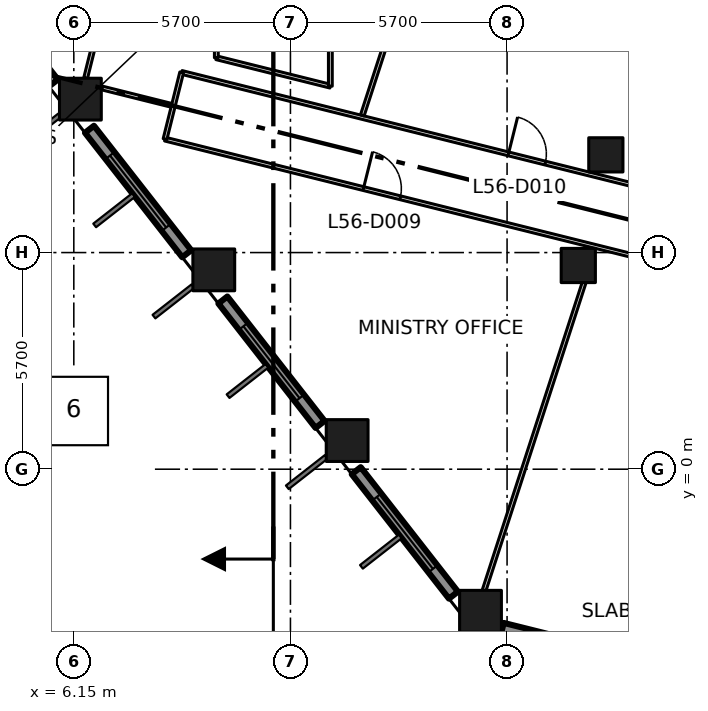
"""IFC4 building model, lengths in metres.
Left out: names, types, materials, properties, quantities, classifications, styles, units other than length and angle.
Written with IfcOpenShell. Run it as: python <this file> out.ifc"""

import sys

from ifc_helpers import new_model, si_unit, direction, frame, frame_2d, origin, origin_2d, place, context, subcontext, project, spatial, rectangle, extrude, element, fill, save


model = new_model("IFC4")
c1 = context("Model", 3, precision=1e-05, world=origin(), true_north=direction((0.0, 1.0)))
c2 = subcontext(c1, "Body", "Model", "MODEL_VIEW")
j1 = project(units=[si_unit("LENGTHUNIT", "METRE"), si_unit("PLANEANGLEUNIT", "RADIAN")], contexts=[c1])
p1 = place(None, origin())
s1 = spatial("IfcSite", under=j1, at=p1, CompositionType="ELEMENT")
p2 = place(p1, origin())
s2 = spatial("IfcBuilding", under=s1, at=p2, CompositionType="ELEMENT")
p3 = place(p2, frame((0.0, 0.0, 246.6)))
s3 = spatial("IfcBuildingStorey", under=s2, at=p3, CompositionType="ELEMENT", Elevation=246.6)
for number, where, z_axis, x_axis in (
    (1, (16.851, -3.738, 0.0), (0.0, 0.0, 1.0), (1.0, 0.0, 0.0)),
    (2, (13.342, 0.754, 0.0), (0.0, 0.0, 1.0), (1.0, 0.0, 0.0)),
    (3, (9.833, 5.245, 0.0), (0.0, 0.0, 1.0), (1.0, 0.0, 0.0)),
    (4, (6.323, 9.737, 0.0), (0.0, 0.0, 1.0), (1.0, 0.0, 0.0)),
):
    element("IfcColumn", number, at=place(p3, frame(where, z_axis=z_axis, x_axis=x_axis)), inside=s3, PredefinedType="COLUMN", context=c2, shape_type="SweptSolid", body=[
        extrude(rectangle(XDim=1.1, YDim=1.1, at=origin_2d()), origin(), (0.0, 0.0, 1.0), 4.2),
    ])
for number, where, z_axis, x_axis in (
    (5, (19.424, 5.36, 0.0), (0.0, 0.0, 1.0), (1.0, 0.0, 0.0)),
    (6, (20.149, 8.271, 0.0), (0.0, 0.0, 1.0), (1.0, 0.0, 0.0)),
):
    element("IfcColumn", number, at=place(p3, frame(where, z_axis=z_axis, x_axis=x_axis)), inside=s3, PredefinedType="COLUMN", context=c2, shape_type="SweptSolid", body=[
        extrude(rectangle(XDim=0.9, YDim=0.9, at=origin_2d()), origin(), (0.0, 0.0, 1.0), 4.2),
    ])
p4 = place(p3, frame((3.053, 13.436, 0.0), z_axis=(0.0, 0.0, 1.0), x_axis=(0.615699893917, -0.787980736205, 0.0)))
e7 = element("IfcWall", 7, at=p4, inside=s3, PredefinedType="SOLIDWALL", context=c2, shape_type="SweptSolid", body=[
    extrude(rectangle(XDim=4.156, YDim=0.3, at=frame_2d((2.078, 0.0))), origin(), (0.0, 0.0, 1.0), 3.15),
])
p5 = place(p4, frame((0.878, 0.0, 0.8)))
e8 = element("IfcOpeningElement", 8, at=p5, cuts=e7, PredefinedType="OPENING", context=c2, shape_type="SweptSolid", body=[
    extrude(rectangle(XDim=2.4, YDim=2.1, at=frame_2d((1.2, 1.05))), frame((0.0, 0.16, 0.0), z_axis=(0.0, -1.0, 0.0), x_axis=(1.0, 0.0, 0.0)), (0.0, 0.0, 1.0), 0.32),
])
p6 = place(p3, frame((6.562, 8.944, 0.0), z_axis=(0.0, 0.0, 1.0), x_axis=(0.615699893917, -0.787980736205, 0.0)))
e9 = element("IfcWall", 9, at=p6, inside=s3, PredefinedType="SOLIDWALL", context=c2, shape_type="SweptSolid", body=[
    extrude(rectangle(XDim=4.156, YDim=0.3, at=frame_2d((2.078, 0.0))), origin(), (0.0, 0.0, 1.0), 3.15),
])
p7 = place(p6, frame((0.878, 0.0, 0.8)))
e10 = element("IfcOpeningElement", 10, at=p7, cuts=e9, PredefinedType="OPENING", context=c2, shape_type="SweptSolid", body=[
    extrude(rectangle(XDim=2.4, YDim=2.1, at=frame_2d((1.2, 1.05))), frame((0.0, 0.16, 0.0), z_axis=(0.0, -1.0, 0.0), x_axis=(1.0, 0.0, 0.0)), (0.0, 0.0, 1.0), 0.32),
])
p8 = place(p3, frame((10.072, 4.452, 0.0), z_axis=(0.0, 0.0, 1.0), x_axis=(0.615660006568, -0.788011901124, 0.0)))
e11 = element("IfcWall", 11, at=p8, inside=s3, PredefinedType="SOLIDWALL", context=c2, shape_type="SweptSolid", body=[
    extrude(rectangle(XDim=4.155, YDim=0.3, at=frame_2d((2.077, 0.0))), origin(), (0.0, 0.0, 1.0), 3.15),
])
p9 = place(p8, frame((0.878, 0.0, 0.8)))
e12 = element("IfcOpeningElement", 12, at=p9, cuts=e11, PredefinedType="OPENING", context=c2, shape_type="SweptSolid", body=[
    extrude(rectangle(XDim=2.4, YDim=2.1, at=frame_2d((1.2, 1.05))), frame((0.0, 0.16, 0.0), z_axis=(0.0, -1.0, 0.0), x_axis=(1.0, 0.0, 0.0)), (0.0, 0.0, 1.0), 0.32),
])
p10 = place(p3, frame((13.581, -0.039, 0.0), z_axis=(0.0, 0.0, 1.0), x_axis=(0.615545986363, -0.788100969846, 0.0)))
e13 = element("IfcWall", 13, at=p10, inside=s3, PredefinedType="SOLIDWALL", context=c2, shape_type="SweptSolid", body=[
    extrude(rectangle(XDim=4.156, YDim=0.3, at=frame_2d((2.078, 0.0))), origin(), (0.0, 0.0, 1.0), 3.15),
])
p11 = place(p10, frame((0.878, 0.0, 0.8)))
e14 = element("IfcOpeningElement", 14, at=p11, cuts=e13, PredefinedType="OPENING", context=c2, shape_type="SweptSolid", body=[
    extrude(rectangle(XDim=2.4, YDim=2.1, at=frame_2d((1.2, 1.05))), frame((0.0, 0.16, 0.0), z_axis=(0.0, -1.0, 0.0), x_axis=(1.0, 0.0, 0.0)), (0.0, 0.0, 1.0), 0.32),
])
p12 = place(p3, frame((17.425, -4.19, 0.0), z_axis=(0.0, 0.0, 1.0), x_axis=(0.970270592847, -0.242022677978, 0.0)))
e15 = element("IfcWall", 15, at=p12, inside=s3, PredefinedType="SOLIDWALL", context=c2, shape_type="SweptSolid", body=[
    extrude(rectangle(XDim=4.368, YDim=0.3, at=frame_2d((2.184, 0.0))), origin(), (0.0, 0.0, 1.0), 3.15),
])
p13 = place(p12, frame((0.983, 0.0, 0.8)))
e16 = element("IfcOpeningElement", 16, at=p13, cuts=e15, PredefinedType="OPENING", context=c2, shape_type="SweptSolid", body=[
    extrude(rectangle(XDim=2.4, YDim=2.1, at=frame_2d((1.2, 1.05))), frame((0.0, 0.16, 0.0), z_axis=(0.0, -1.0, 0.0), x_axis=(1.0, 0.0, 0.0)), (0.0, 0.0, 1.0), 0.32),
])
p14 = place(p3, frame((8.55, 8.685, 0.0), z_axis=(0.0, 0.0, 1.0), x_axis=(0.970297603286, -0.241914367199, 0.0)))
e17 = element("IfcWall", 17, at=p14, inside=s3, PredefinedType="PARTITIONING", context=c2, shape_type="SweptSolid", body=[
    extrude(rectangle(XDim=50.675, YDim=0.1, at=frame_2d((25.337, 0.0))), origin(), (0.0, 0.0, 1.0), 3.9),
])
p15 = place(p14, frame((35.657, 0.0, 0.0)))
e18 = element("IfcOpeningElement", 18, at=p15, cuts=e17, PredefinedType="OPENING", context=c2, shape_type="SweptSolid", body=[
    extrude(rectangle(XDim=1.8, YDim=2.1, at=frame_2d((0.9, 1.05))), frame((0.0, 0.06, 0.0), z_axis=(0.0, -1.0, 0.0), x_axis=(1.0, 0.0, 0.0)), (0.0, 0.0, 1.0), 0.12),
])
p16 = place(p14, frame((14.657, 0.0, 0.0)))
e19 = element("IfcOpeningElement", 19, at=p16, cuts=e17, PredefinedType="OPENING", context=c2, shape_type="SweptSolid", body=[
    extrude(rectangle(XDim=1.0, YDim=2.1, at=frame_2d((0.5, 1.05))), frame((0.0, 0.06, 0.0), z_axis=(0.0, -1.0, 0.0), x_axis=(1.0, 0.0, 0.0)), (0.0, 0.0, 1.0), 0.12),
])
p17 = place(p14, frame((19.357, 0.0, 0.0)))
e20 = element("IfcOpeningElement", 20, at=p17, cuts=e17, PredefinedType="OPENING", context=c2, shape_type="SweptSolid", body=[
    extrude(rectangle(XDim=1.8, YDim=2.1, at=frame_2d((0.9, 1.05))), frame((0.0, 0.06, 0.0), z_axis=(0.0, -1.0, 0.0), x_axis=(1.0, 0.0, 0.0)), (0.0, 0.0, 1.0), 0.12),
])
p18 = place(p14, frame((5.38, 0.0, 0.0)))
e21 = element("IfcOpeningElement", 21, at=p18, cuts=e17, PredefinedType="OPENING", context=c2, shape_type="SweptSolid", body=[
    extrude(rectangle(XDim=1.0, YDim=2.1, at=frame_2d((0.5, 1.05))), frame((0.0, 0.06, 0.0), z_axis=(0.0, -1.0, 0.0), x_axis=(1.0, 0.0, 0.0)), (0.0, 0.0, 1.0), 0.12),
])
p19 = place(p3, frame((8.988, 10.44, 0.0), z_axis=(0.0, 0.0, 1.0), x_axis=(0.970301223092, -0.241899848006, 0.0)))
e22 = element("IfcWall", 22, at=p19, inside=s3, PredefinedType="PARTITIONING", context=c2, shape_type="SweptSolid", body=[
    extrude(rectangle(XDim=19.879, YDim=0.1, at=frame_2d((9.94, 0.0))), origin(), (0.0, 0.0, 1.0), 3.9),
])
p20 = place(p19, frame((8.861, 0.0, 0.0)))
e23 = element("IfcOpeningElement", 23, at=p20, cuts=e22, PredefinedType="OPENING", context=c2, shape_type="SweptSolid", body=[
    extrude(rectangle(XDim=1.0, YDim=2.1, at=frame_2d((0.5, 1.05))), frame((0.0, 0.06, 0.0), z_axis=(0.0, -1.0, 0.0), x_axis=(1.0, 0.0, 0.0)), (0.0, 0.0, 1.0), 0.12),
])
p21 = place(p3, frame((8.988, 10.44, 0.0), z_axis=(0.0, 0.0, 1.0), x_axis=(-0.242154485745, -0.970237705428, 0.0)))
e24 = element("IfcWall", 24, at=p21, inside=s3, PredefinedType="PARTITIONING", context=c2, shape_type="SweptSolid", body=[
    extrude(rectangle(XDim=1.809, YDim=0.1, at=frame_2d((0.904, 0.0))), origin(), (0.0, 0.0, 1.0), 3.9),
])
p22 = place(p3, frame((9.9, 10.826, 0.0), z_axis=(0.0, 0.0, 1.0), x_axis=(0.970290953223, -0.241941038466, 0.0)))
e25 = element("IfcWall", 25, at=p22, inside=s3, PredefinedType="PARTITIONING", context=c2, shape_type="SweptSolid", body=[
    extrude(rectangle(XDim=3.092, YDim=0.1, at=frame_2d((1.546, 0.0))), origin(), (0.0, 0.0, 1.0), 3.9),
])
p23 = place(p3, frame((9.9, 12.2, 0.0), z_axis=(0.0, 0.0, 1.0), x_axis=(0.0, -1.0, 0.0)))
e26 = element("IfcWall", 26, at=p23, inside=s3, PredefinedType="PARTITIONING", context=c2, shape_type="SweptSolid", body=[
    extrude(rectangle(XDim=1.374, YDim=0.1, at=frame_2d((0.687, 0.0))), origin(), (0.0, 0.0, 1.0), 3.9),
])
p24 = place(p3, frame((12.9, 10.078, 0.0), z_axis=(0.0, 0.0, 1.0), x_axis=(0.0, 1.0, 0.0)))
e27 = element("IfcWall", 27, at=p24, inside=s3, PredefinedType="PARTITIONING", context=c2, shape_type="SweptSolid", body=[
    extrude(rectangle(XDim=4.022, YDim=0.1, at=frame_2d((2.011, 0.0))), origin(), (0.0, 0.0, 1.0), 3.9),
])
p25 = place(p3, frame((6.922, 12.138, 0.0), z_axis=(0.0, 0.0, 1.0), x_axis=(-0.242264600824, -0.970210215978, 0.0)))
e28 = element("IfcWall", 28, at=p25, inside=s3, PredefinedType="PARTITIONING", context=c2, shape_type="SweptSolid", body=[
    extrude(rectangle(XDim=1.908, YDim=0.1, at=frame_2d((0.954, 0.0))), origin(), (0.0, 0.0, 1.0), 3.9),
])
p26 = place(p3, frame((8.72, 9.574, 0.0), z_axis=(0.0, 0.0, 1.0), x_axis=(-0.970240497311, 0.242143299263, 0.0)))
e29 = element("IfcWall", 29, at=p26, inside=s3, PredefinedType="PARTITIONING", context=c2, shape_type="SweptSolid", body=[
    extrude(rectangle(XDim=1.904, YDim=0.1, at=frame_2d((0.952, 0.0))), origin(), (0.0, 0.0, 1.0), 3.9),
])
p27 = place(p3, frame((13.741, 9.31, 0.0), z_axis=(0.0, 0.0, 1.0), x_axis=(0.308976461467, 0.95106968528, 0.0)))
e30 = element("IfcWall", 30, at=p27, inside=s3, PredefinedType="PARTITIONING", context=c2, shape_type="SweptSolid", body=[
    extrude(rectangle(XDim=5.036, YDim=0.1, at=frame_2d((2.518, 0.0))), origin(), (0.0, 0.0, 1.0), 3.9),
])
p28 = place(p3, frame((16.946, -3.188, 0.0), z_axis=(0.0, 0.0, 1.0), x_axis=(0.308984279279, 0.951067145452, 0.0)))
e31 = element("IfcWall", 31, at=p28, inside=s3, PredefinedType="PARTITIONING", context=c2, shape_type="SweptSolid", body=[
    extrude(rectangle(XDim=8.515, YDim=0.1, at=frame_2d((4.257, 0.0))), origin(), (0.0, 0.0, 1.0), 3.9),
])
p29 = place(p7, origin())
e32 = element("IfcWindow", 32, at=p29, inside=s3, PartitioningType="DOUBLE_PANEL_VERTICAL", PredefinedType="WINDOW", context=c2, shape_type="SweptSolid", body=[
    extrude(rectangle(XDim=2.4, YDim=2.1, at=frame_2d((1.2, 1.05))), frame((0.0, 0.03, 0.0), z_axis=(0.0, -1.0, 0.0), x_axis=(1.0, 0.0, 0.0)), (0.0, 0.0, 1.0), 0.06),
])
fill(e10, e32)
p30 = place(p9, origin())
e33 = element("IfcWindow", 33, at=p30, inside=s3, PartitioningType="DOUBLE_PANEL_VERTICAL", PredefinedType="WINDOW", context=c2, shape_type="SweptSolid", body=[
    extrude(rectangle(XDim=2.4, YDim=2.1, at=frame_2d((1.2, 1.05))), frame((0.0, 0.03, 0.0), z_axis=(0.0, -1.0, 0.0), x_axis=(1.0, 0.0, 0.0)), (0.0, 0.0, 1.0), 0.06),
])
fill(e12, e33)
p31 = place(p11, origin())
e34 = element("IfcWindow", 34, at=p31, inside=s3, PartitioningType="DOUBLE_PANEL_VERTICAL", PredefinedType="WINDOW", context=c2, shape_type="SweptSolid", body=[
    extrude(rectangle(XDim=2.4, YDim=2.1, at=frame_2d((1.2, 1.05))), frame((0.0, 0.03, 0.0), z_axis=(0.0, -1.0, 0.0), x_axis=(1.0, 0.0, 0.0)), (0.0, 0.0, 1.0), 0.06),
])
fill(e14, e34)
p32 = place(p18, origin())
e35 = element("IfcDoor", 35, at=p32, inside=s3, OperationType="SINGLE_SWING_LEFT", PredefinedType="DOOR", context=c2, shape_type="SweptSolid", body=[
    extrude(rectangle(XDim=1.0, YDim=2.1, at=frame_2d((0.5, 1.05))), frame((0.0, 0.025, 0.0), z_axis=(0.0, -1.0, 0.0), x_axis=(1.0, 0.0, 0.0)), (0.0, 0.0, 1.0), 0.05),
])
fill(e21, e35)
p33 = place(p20, origin())
e36 = element("IfcDoor", 36, at=p33, inside=s3, OperationType="SINGLE_SWING_LEFT", PredefinedType="DOOR", context=c2, shape_type="SweptSolid", body=[
    extrude(rectangle(XDim=1.0, YDim=2.1, at=frame_2d((0.5, 1.05))), frame((0.0, 0.025, 0.0), z_axis=(0.0, -1.0, 0.0), x_axis=(1.0, 0.0, 0.0)), (0.0, 0.0, 1.0), 0.05),
])
fill(e23, e36)
save(model, sys.argv[1])
